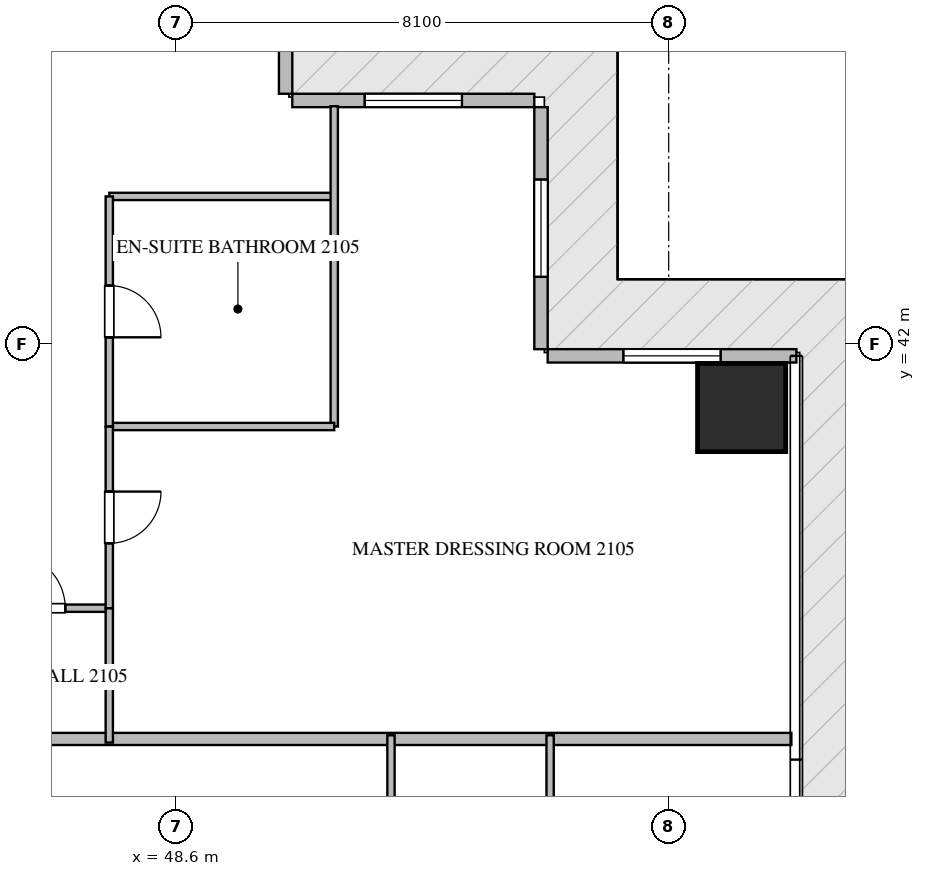
"""IFC4 building model, lengths in metres.
Left out: names, types, materials, properties, quantities, classifications, styles, units other than length and angle.
Written with IfcOpenShell. Run it as: python <this file> out.ifc"""

import sys

from ifc_helpers import new_model, si_unit, direction, frame, frame_2d, origin, origin_2d, place, context, subcontext, project, spatial, rectangle, extrude, source, transform, mapped, element, fill, save


model = new_model("IFC4")
c1 = context("Model", 3, precision=1e-05, world=origin(), true_north=direction((0.0, 1.0)))
c2 = subcontext(c1, "Body", "Model", "MODEL_VIEW")
j1 = project(units=[si_unit("LENGTHUNIT", "METRE"), si_unit("PLANEANGLEUNIT", "RADIAN")], contexts=[c1])
p1 = place(None, origin())
s1 = spatial("IfcSite", under=j1, at=p1, CompositionType="ELEMENT")
p2 = place(p1, origin())
s2 = spatial("IfcBuilding", under=s1, at=p2, CompositionType="ELEMENT")
p3 = place(p2, frame((0.0, 0.0, 86.7)))
s3 = spatial("IfcBuildingStorey", under=s2, at=p3, CompositionType="ELEMENT", Elevation=86.7)
m1 = source(origin(), c2, "Body", "SweptSolid", [
    extrude(rectangle(XDim=1.45, YDim=1.45, at=origin_2d()), origin(), (0.0, 0.0, 1.0), 3.75),
])
p4 = place(p3, frame((57.9, 40.95, -0.26), z_axis=(0.0, 0.0, 1.0), x_axis=(1.0, 0.0, 0.0)))
e1 = element("IfcColumn", 1, at=p4, inside=s3, PredefinedType="COLUMN", context=c2, shape_type="MappedRepresentation", body=[
    mapped(m1, transform((0.0, 0.0, 0.0), scale=1.0)),
])
p5 = place(p3, frame((58.8, 41.8, 0.0), z_axis=(0.0, 0.0, 1.0), x_axis=(-1.0, 0.0, 0.0)))
e2 = element("IfcWall", 2, at=p5, inside=s3, PredefinedType="ELEMENTEDWALL", context=c2, shape_type="SweptSolid", body=[
    extrude(rectangle(XDim=4.09, YDim=0.22, at=frame_2d((2.045, 0.0))), origin(), (0.0, 0.0, 1.0), 3.475),
])
p6 = place(p5, frame((1.245, 0.0, 0.65)))
e3 = element("IfcOpeningElement", 3, at=p6, cuts=e2, PredefinedType="OPENING", context=c2, shape_type="SweptSolid", body=[
    extrude(rectangle(XDim=1.6, YDim=2.1, at=frame_2d((0.8, 1.05))), frame((0.0, 0.12, 0.0), z_axis=(0.0, -1.0, 0.0), x_axis=(1.0, 0.0, 0.0)), (0.0, 0.0, 1.0), 0.24),
])
p7 = place(p3, frame((54.6, 41.91, 0.0), z_axis=(0.0, 0.0, 1.0), x_axis=(0.0, 1.0, 0.0)))
e4 = element("IfcWall", 4, at=p7, inside=s3, PredefinedType="ELEMENTEDWALL", context=c2, shape_type="SweptSolid", body=[
    extrude(rectangle(XDim=3.98, YDim=0.22, at=frame_2d((1.99, 0.0))), origin(), (0.0, 0.0, 1.0), 3.475),
])
p8 = place(p7, frame((1.19, 0.0, 0.65)))
e5 = element("IfcOpeningElement", 5, at=p8, cuts=e4, PredefinedType="OPENING", context=c2, shape_type="SweptSolid", body=[
    extrude(rectangle(XDim=1.6, YDim=2.1, at=frame_2d((0.8, 1.05))), frame((0.0, 0.12, 0.0), z_axis=(0.0, -1.0, 0.0), x_axis=(1.0, 0.0, 0.0)), (0.0, 0.0, 1.0), 0.24),
])
p9 = place(p3, frame((54.49, 46.0, 0.0), z_axis=(0.0, 0.0, 1.0), x_axis=(-1.0, 0.0, 0.0)))
e6 = element("IfcWall", 6, at=p9, inside=s3, PredefinedType="ELEMENTEDWALL", context=c2, shape_type="SweptSolid", body=[
    extrude(rectangle(XDim=3.98, YDim=0.22, at=frame_2d((1.99, 0.0))), origin(), (0.0, 0.0, 1.0), 3.475),
])
p10 = place(p9, frame((1.19, 0.0, 0.65)))
e7 = element("IfcOpeningElement", 7, at=p10, cuts=e6, PredefinedType="OPENING", context=c2, shape_type="SweptSolid", body=[
    extrude(rectangle(XDim=1.6, YDim=2.1, at=frame_2d((0.8, 1.05))), frame((0.0, 0.12, 0.0), z_axis=(0.0, -1.0, 0.0), x_axis=(1.0, 0.0, 0.0)), (0.0, 0.0, 1.0), 0.24),
])
p11 = place(p3, frame((50.4, 46.11, 0.0), z_axis=(0.0, 0.0, 1.0), x_axis=(0.0, 1.0, 0.0)))
e8 = element("IfcWall", 8, at=p11, inside=s3, PredefinedType="ELEMENTEDWALL", context=c2, shape_type="SweptSolid", body=[
    extrude(rectangle(XDim=4.09, YDim=0.22, at=frame_2d((2.045, 0.0))), origin(), (0.0, 0.0, 1.0), 3.475),
])
p12 = place(p11, frame((1.245, 0.0, 0.65)))
e9 = element("IfcOpeningElement", 9, at=p12, cuts=e8, PredefinedType="OPENING", context=c2, shape_type="SweptSolid", body=[
    extrude(rectangle(XDim=1.6, YDim=2.1, at=frame_2d((0.8, 1.05))), frame((0.0, 0.12, 0.0), z_axis=(0.0, -1.0, 0.0), x_axis=(1.0, 0.0, 0.0)), (0.0, 0.0, 1.0), 0.24),
])
p13 = place(p3, frame((43.4, 35.5, 0.0), z_axis=(0.0, 0.0, 1.0), x_axis=(1.0, 0.0, 0.0)))
e10 = element("IfcWall", 10, at=p13, inside=s3, PredefinedType="PARTITIONING", context=c2, shape_type="SweptSolid", body=[
    extrude(rectangle(XDim=15.318, YDim=0.2, at=frame_2d((7.659, 0.0))), origin(), (0.0, 0.0, 1.0), 3.49),
])
p14 = place(p3, frame((45.152, 37.65, 0.0), z_axis=(0.0, 0.0, 1.0), x_axis=(1.0, 0.0, 0.0)))
e11 = element("IfcWall", 11, at=p14, inside=s3, PredefinedType="PARTITIONING", context=c2, shape_type="SweptSolid", body=[
    extrude(rectangle(XDim=2.348, YDim=0.12, at=frame_2d((1.174, 0.0))), origin(), (0.0, 0.0, 1.0), 3.49),
])
p15 = place(p14, frame((0.724, 0.0, 0.0)))
e12 = element("IfcOpeningElement", 12, at=p15, cuts=e11, PredefinedType="OPENING", context=c2, shape_type="SweptSolid", body=[
    extrude(rectangle(XDim=0.9, YDim=2.1, at=frame_2d((0.45, 1.05))), frame((0.0, 0.07, 0.0), z_axis=(0.0, -1.0, 0.0), x_axis=(1.0, 0.0, 0.0)), (0.0, 0.0, 1.0), 0.14),
])
p16 = place(p3, frame((47.5, 44.422, 0.0), z_axis=(0.0, 0.0, 1.0), x_axis=(1.0, 0.0, 0.0)))
e13 = element("IfcWall", 13, at=p16, inside=s3, PredefinedType="PARTITIONING", context=c2, shape_type="SweptSolid", body=[
    extrude(rectangle(XDim=3.7, YDim=0.12, at=frame_2d((1.85, 0.0))), origin(), (0.0, 0.0, 1.0), 3.49),
])
p17 = place(p3, frame((51.2, 45.905, 0.0), z_axis=(0.0, 0.0, 1.0), x_axis=(0.0, -1.0, 0.0)))
e14 = element("IfcWall", 14, at=p17, inside=s3, PredefinedType="PARTITIONING", context=c2, shape_type="SweptSolid", body=[
    extrude(rectangle(XDim=5.267, YDim=0.12, at=frame_2d((2.634, 0.0))), origin(), (0.0, 0.0, 1.0), 3.49),
])
p18 = place(p3, frame((47.5, 40.638, 0.0), z_axis=(0.0, 0.0, 1.0), x_axis=(1.0, 0.0, 0.0)))
e15 = element("IfcWall", 15, at=p18, inside=s3, PredefinedType="PARTITIONING", context=c2, shape_type="SweptSolid", body=[
    extrude(rectangle(XDim=3.7, YDim=0.12, at=frame_2d((1.85, 0.0))), origin(), (0.0, 0.0, 1.0), 3.49),
])
p19 = place(p3, frame((47.5, 44.422, 0.0), z_axis=(0.0, 0.0, 1.0), x_axis=(0.0, -1.0, 0.0)))
e16 = element("IfcWall", 16, at=p19, inside=s3, PredefinedType="PARTITIONING", context=c2, shape_type="SweptSolid", body=[
    extrude(rectangle(XDim=3.784, YDim=0.12, at=frame_2d((1.892, 0.0))), origin(), (0.0, 0.0, 1.0), 3.49),
])
p20 = place(p19, frame((1.467, 0.0, 0.0)))
e17 = element("IfcOpeningElement", 17, at=p20, cuts=e16, PredefinedType="OPENING", context=c2, shape_type="SweptSolid", body=[
    extrude(rectangle(XDim=0.85, YDim=2.1, at=frame_2d((0.425, 1.05))), frame((0.0, 0.07, 0.0), z_axis=(0.0, -1.0, 0.0), x_axis=(1.0, 0.0, 0.0)), (0.0, 0.0, 1.0), 0.14),
])
p21 = place(p3, frame((47.5, 40.636, 0.0), z_axis=(0.0, 0.0, 1.0), x_axis=(0.0, -1.0, 0.0)))
e18 = element("IfcWall", 18, at=p21, inside=s3, PredefinedType="PARTITIONING", context=c2, shape_type="SweptSolid", body=[
    extrude(rectangle(XDim=2.986, YDim=0.12, at=frame_2d((1.493, 0.0))), origin(), (0.0, 0.0, 1.0), 3.49),
])
p22 = place(p21, frame((1.068, 0.0, 0.0)))
e19 = element("IfcOpeningElement", 19, at=p22, cuts=e18, PredefinedType="OPENING", context=c2, shape_type="SweptSolid", body=[
    extrude(rectangle(XDim=0.85, YDim=2.1, at=frame_2d((0.425, 1.05))), frame((0.0, 0.07, 0.0), z_axis=(0.0, -1.0, 0.0), x_axis=(1.0, 0.0, 0.0)), (0.0, 0.0, 1.0), 0.14),
])
p23 = place(p3, frame((47.5, 37.648, 0.0), z_axis=(0.0, 0.0, 1.0), x_axis=(0.0, -1.0, 0.0)))
e20 = element("IfcWall", 20, at=p23, inside=s3, PredefinedType="PARTITIONING", context=c2, shape_type="SweptSolid", body=[
    extrude(rectangle(XDim=2.208, YDim=0.12, at=frame_2d((1.104, 0.0))), origin(), (0.0, 0.0, 1.0), 3.49),
])
for number, where, z_axis, x_axis in (
    (21, (54.75, 30.15, 0.0), (0.0, 0.0, 1.0), (0.0, 1.0, 0.0)),
    (22, (52.133, 30.15, 0.0), (0.0, 0.0, 1.0), (0.0, 1.0, 0.0)),
):
    element("IfcWall", number, at=place(p3, frame(where, z_axis=z_axis, x_axis=x_axis)), inside=s3, PredefinedType="PARTITIONING", context=c2, shape_type="SweptSolid", body=[
        extrude(rectangle(XDim=5.41, YDim=0.12, at=frame_2d((2.705, 0.0))), origin(), (0.0, 0.0, 1.0), 3.49),
    ])
m2 = source(origin(), c2, "Body", "SweptSolid", [
    extrude(rectangle(XDim=1.6, YDim=2.1, at=frame_2d((0.8, 1.05))), frame((0.0, 0.03, 0.0), z_axis=(0.0, -1.0, 0.0), x_axis=(1.0, 0.0, 0.0)), (0.0, 0.0, 1.0), 0.06),
])
p24 = place(p6, origin())
e23 = element("IfcWindow", 23, at=p24, inside=s3, PartitioningType="SINGLE_PANEL", PredefinedType="WINDOW", context=c2, shape_type="MappedRepresentation", body=[
    mapped(m2, transform((0.0, 0.0, 0.0), scale=1.0)),
])
fill(e3, e23)
p25 = place(p8, origin())
e24 = element("IfcWindow", 24, at=p25, inside=s3, PartitioningType="SINGLE_PANEL", PredefinedType="WINDOW", context=c2, shape_type="MappedRepresentation", body=[
    mapped(m2, transform((0.0, 0.0, 0.0), scale=1.0)),
])
fill(e5, e24)
p26 = place(p10, origin())
e25 = element("IfcWindow", 25, at=p26, inside=s3, PartitioningType="SINGLE_PANEL", PredefinedType="WINDOW", context=c2, shape_type="MappedRepresentation", body=[
    mapped(m2, transform((0.0, 0.0, 0.0), scale=1.0)),
])
fill(e7, e25)
m3 = source(origin(), c2, "Body", "SweptSolid", [
    extrude(rectangle(XDim=0.9, YDim=2.1, at=frame_2d((0.45, 1.05))), frame((0.0, 0.025, 0.0), z_axis=(0.0, -1.0, 0.0), x_axis=(1.0, 0.0, 0.0)), (0.0, 0.0, 1.0), 0.05),
])
p27 = place(p15, origin())
e26 = element("IfcDoor", 26, at=p27, inside=s3, OperationType="SINGLE_SWING_LEFT", PredefinedType="DOOR", context=c2, shape_type="MappedRepresentation", body=[
    mapped(m3, transform((0.0, 0.0, 0.0), scale=1.0)),
])
fill(e12, e26)
m4 = source(origin(), c2, "Body", "SweptSolid", [
    extrude(rectangle(XDim=0.85, YDim=2.1, at=frame_2d((0.425, 1.05))), frame((0.0, 0.025, 0.0), z_axis=(0.0, -1.0, 0.0), x_axis=(1.0, 0.0, 0.0)), (0.0, 0.0, 1.0), 0.05),
])
p28 = place(p20, origin())
e27 = element("IfcDoor", 27, at=p28, inside=s3, OperationType="SINGLE_SWING_RIGHT", PredefinedType="DOOR", context=c2, shape_type="MappedRepresentation", body=[
    mapped(m4, transform((0.0, 0.0, 0.0), scale=1.0)),
])
fill(e17, e27)
p29 = place(p22, origin())
e28 = element("IfcDoor", 28, at=p29, inside=s3, OperationType="SINGLE_SWING_LEFT", PredefinedType="DOOR", context=c2, shape_type="MappedRepresentation", body=[
    mapped(m4, transform((0.0, 0.0, 0.0), scale=1.0)),
])
fill(e19, e28)
save(model, sys.argv[1])
